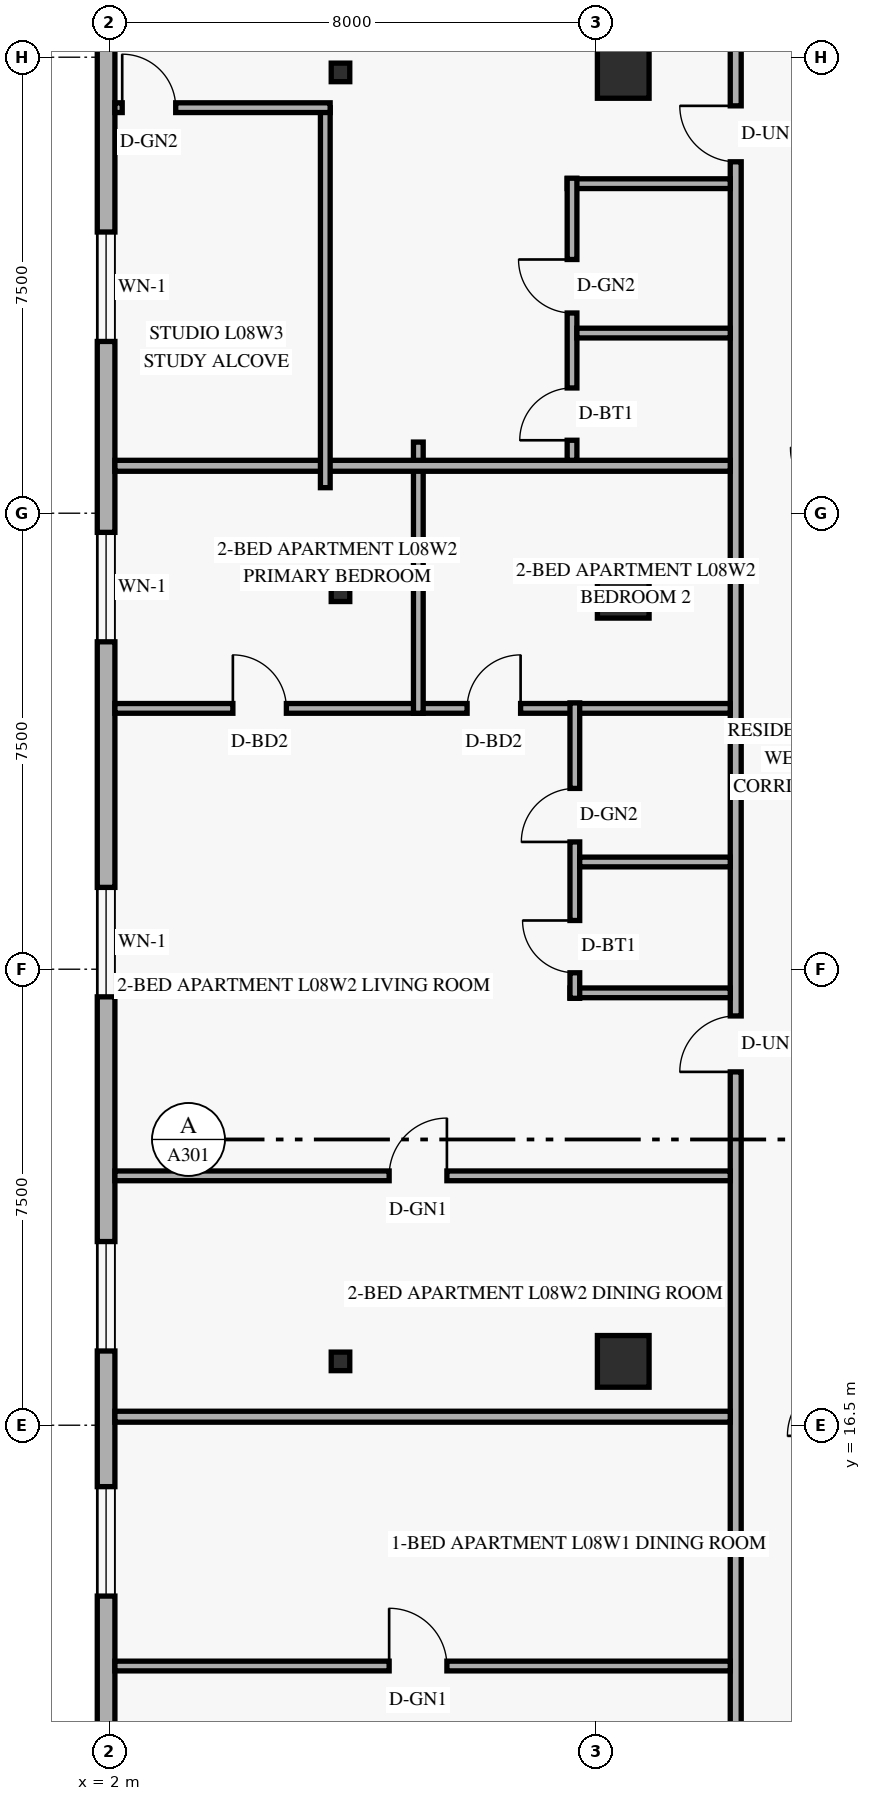
"""IFC4 building model, lengths in metres.
Left out: names, types, materials, properties, quantities, classifications, styles, units other than length and angle.
Written with IfcOpenShell. Run it as: python <this file> out.ifc"""

import sys

from ifc_helpers import new_model, si_unit, direction, frame, frame_2d, origin, origin_2d, place, context, subcontext, project, spatial, rectangle, hollow_rectangle, extrude, element, fill, save


model = new_model("IFC4")
c1 = context("Model", 3, precision=1e-05, world=origin(), true_north=direction((0.0, 1.0)))
c2 = subcontext(c1, "Body", "Model", "MODEL_VIEW")
j1 = project(units=[si_unit("LENGTHUNIT", "METRE"), si_unit("PLANEANGLEUNIT", "RADIAN")], contexts=[c1])
p1 = place(None, origin())
s1 = spatial("IfcSite", under=j1, at=p1, CompositionType="ELEMENT")
p2 = place(p1, origin())
s2 = spatial("IfcBuilding", under=s1, at=p2, CompositionType="ELEMENT")
p3 = place(p2, frame((0.0, 0.0, 34.8)))
s3 = spatial("IfcBuildingStorey", under=s2, at=p3, CompositionType="ELEMENT", Elevation=34.8)
for number, where, z_axis, x_axis in (
    (1, (5.8, 17.55, 0.0), (0.0, 0.0, 1.0), (1.0, 0.0, 0.0)),
    (2, (5.8, 30.2, 0.0), (0.0, 0.0, 1.0), (1.0, 0.0, 0.0)),
    (3, (5.8, 38.75, 0.0), (0.0, 0.0, 1.0), (1.0, 0.0, 0.0)),
):
    element("IfcColumn", number, at=place(p3, frame(where, z_axis=z_axis, x_axis=x_axis)), inside=s3, PredefinedType="COLUMN", context=c2, shape_type="SweptSolid", body=[
        extrude(hollow_rectangle(XDim=0.305, YDim=0.305, WallThickness=0.013, at=origin_2d()), origin(), (0.0, 0.0, 1.0), 3.6),
    ])
for number, where, z_axis, x_axis in (
    (4, (10.45, 17.55, 0.0), (0.0, 0.0, 1.0), (1.0, 0.0, 0.0)),
    (5, (10.45, 30.2, 0.0), (0.0, 0.0, 1.0), (1.0, 0.0, 0.0)),
    (6, (10.45, 38.75, 0.0), (0.0, 0.0, 1.0), (1.0, 0.0, 0.0)),
):
    element("IfcColumn", number, at=place(p3, frame(where, z_axis=z_axis, x_axis=x_axis)), inside=s3, PredefinedType="COLUMN", context=c2, shape_type="SweptSolid", body=[
        extrude(rectangle(XDim=0.85, YDim=0.85, at=origin_2d()), origin(), (0.0, 0.0, 1.0), 3.6),
    ])
p4 = place(p3, frame((1.945, 43.38, 0.0), z_axis=(0.0, 0.0, 1.0), x_axis=(0.0, -1.0, 0.0)))
e7 = element("IfcWall", 7, at=p4, inside=s3, PredefinedType="SOLIDWALL", context=c2, shape_type="SweptSolid", body=[
    extrude(rectangle(XDim=38.76, YDim=0.29, at=frame_2d((19.38, 0.0))), origin(), (0.0, 0.0, 1.0), 3.36),
])
p5 = place(p4, frame((33.9, 0.0, 0.85)))
e8 = element("IfcOpeningElement", 8, at=p5, cuts=e7, PredefinedType="OPENING", context=c2, shape_type="SweptSolid", body=[
    extrude(rectangle(XDim=1.8, YDim=1.6, at=frame_2d((0.9, 0.8))), frame((0.0, 0.155, 0.0), z_axis=(0.0, -1.0, 0.0), x_axis=(1.0, 0.0, 0.0)), (0.0, 0.0, 1.0), 0.31),
])
p6 = place(p4, frame((27.89, 0.0, 0.85)))
e9 = element("IfcOpeningElement", 9, at=p6, cuts=e7, PredefinedType="OPENING", context=c2, shape_type="SweptSolid", body=[
    extrude(rectangle(XDim=1.8, YDim=1.6, at=frame_2d((0.9, 0.8))), frame((0.0, 0.155, 0.0), z_axis=(0.0, -1.0, 0.0), x_axis=(1.0, 0.0, 0.0)), (0.0, 0.0, 1.0), 0.31),
])
p7 = place(p4, frame((23.859, 0.0, 0.85)))
e10 = element("IfcOpeningElement", 10, at=p7, cuts=e7, PredefinedType="OPENING", context=c2, shape_type="SweptSolid", body=[
    extrude(rectangle(XDim=1.8, YDim=1.6, at=frame_2d((0.9, 0.8))), frame((0.0, 0.155, 0.0), z_axis=(0.0, -1.0, 0.0), x_axis=(1.0, 0.0, 0.0)), (0.0, 0.0, 1.0), 0.31),
])
p8 = place(p4, frame((18.034, 0.0, 0.85)))
e11 = element("IfcOpeningElement", 11, at=p8, cuts=e7, PredefinedType="OPENING", context=c2, shape_type="SweptSolid", body=[
    extrude(rectangle(XDim=1.8, YDim=1.6, at=frame_2d((0.9, 0.8))), frame((0.0, 0.155, 0.0), z_axis=(0.0, -1.0, 0.0), x_axis=(1.0, 0.0, 0.0)), (0.0, 0.0, 1.0), 0.31),
])
p9 = place(p4, frame((12.195, 0.0, 0.85)))
e12 = element("IfcOpeningElement", 12, at=p9, cuts=e7, PredefinedType="OPENING", context=c2, shape_type="SweptSolid", body=[
    extrude(rectangle(XDim=1.8, YDim=1.6, at=frame_2d((0.9, 0.8))), frame((0.0, 0.155, 0.0), z_axis=(0.0, -1.0, 0.0), x_axis=(1.0, 0.0, 0.0)), (0.0, 0.0, 1.0), 0.31),
])
p10 = place(p4, frame((7.255, 0.0, 0.85)))
e13 = element("IfcOpeningElement", 13, at=p10, cuts=e7, PredefinedType="OPENING", context=c2, shape_type="SweptSolid", body=[
    extrude(rectangle(XDim=1.8, YDim=1.6, at=frame_2d((0.9, 0.8))), frame((0.0, 0.155, 0.0), z_axis=(0.0, -1.0, 0.0), x_axis=(1.0, 0.0, 0.0)), (0.0, 0.0, 1.0), 0.31),
])
p11 = place(p4, frame((1.705, 0.0, 0.85)))
e14 = element("IfcOpeningElement", 14, at=p11, cuts=e7, PredefinedType="OPENING", context=c2, shape_type="SweptSolid", body=[
    extrude(rectangle(XDim=1.8, YDim=1.6, at=frame_2d((0.9, 0.8))), frame((0.0, 0.155, 0.0), z_axis=(0.0, -1.0, 0.0), x_axis=(1.0, 0.0, 0.0)), (0.0, 0.0, 1.0), 0.31),
])
p12 = place(p3, frame((12.3, 1.29, 0.0), z_axis=(0.0, 0.0, 1.0), x_axis=(0.0, 1.0, 0.0)))
e15 = element("IfcWall", 15, at=p12, inside=s3, PredefinedType="STANDARD", context=c2, shape_type="SweptSolid", body=[
    extrude(rectangle(XDim=45.42, YDim=0.18, at=frame_2d((22.71, 0.0))), origin(), (0.0, 0.0, 1.0), 2.649),
])
p13 = place(p12, frame((8.06, 0.0, 0.0)))
e16 = element("IfcOpeningElement", 16, at=p13, cuts=e15, PredefinedType="OPENING", context=c2, shape_type="SweptSolid", body=[
    extrude(rectangle(XDim=0.92, YDim=2.15, at=frame_2d((0.46, 1.075))), frame((0.0, 0.1, 0.0), z_axis=(0.0, -1.0, 0.0), x_axis=(1.0, 0.0, 0.0)), (0.0, 0.0, 1.0), 0.2),
])
p14 = place(p12, frame((21.021, 0.0, 0.0)))
e17 = element("IfcOpeningElement", 17, at=p14, cuts=e15, PredefinedType="OPENING", context=c2, shape_type="SweptSolid", body=[
    extrude(rectangle(XDim=0.92, YDim=2.15, at=frame_2d((0.46, 1.075))), frame((0.0, 0.1, 0.0), z_axis=(0.0, -1.0, 0.0), x_axis=(1.0, 0.0, 0.0)), (0.0, 0.0, 1.0), 0.2),
])
p15 = place(p12, frame((35.99, 0.0, 0.0)))
e18 = element("IfcOpeningElement", 18, at=p15, cuts=e15, PredefinedType="OPENING", context=c2, shape_type="SweptSolid", body=[
    extrude(rectangle(XDim=0.92, YDim=2.15, at=frame_2d((0.46, 1.075))), frame((0.0, 0.1, 0.0), z_axis=(0.0, -1.0, 0.0), x_axis=(1.0, 0.0, 0.0)), (0.0, 0.0, 1.0), 0.2),
])
p16 = place(p3, frame((2.09, 12.54, 0.0), z_axis=(0.0, 0.0, 1.0), x_axis=(1.0, 0.0, 0.0)))
e19 = element("IfcWall", 19, at=p16, inside=s3, PredefinedType="PARTITIONING", context=c2, shape_type="SweptSolid", body=[
    extrude(rectangle(XDim=10.12, YDim=0.16, at=frame_2d((5.06, 0.0))), origin(), (0.0, 0.0, 1.0), 2.649),
])
p17 = place(p16, frame((4.51, 0.0, 0.0)))
e20 = element("IfcOpeningElement", 20, at=p17, cuts=e19, PredefinedType="OPENING", context=c2, shape_type="SweptSolid", body=[
    extrude(rectangle(XDim=0.95, YDim=2.15, at=frame_2d((0.475, 1.075))), frame((0.0, 0.09, 0.0), z_axis=(0.0, -1.0, 0.0), x_axis=(1.0, 0.0, 0.0)), (0.0, 0.0, 1.0), 0.18),
])
p18 = place(p3, frame((2.09, 16.64, 0.0), z_axis=(0.0, 0.0, 1.0), x_axis=(1.0, 0.0, 0.0)))
e21 = element("IfcWall", 21, at=p18, inside=s3, PredefinedType="PARTITIONING", context=c2, shape_type="SweptSolid", body=[
    extrude(rectangle(XDim=10.12, YDim=0.18, at=frame_2d((5.06, 0.0))), origin(), (0.0, 0.0, 1.0), 2.649),
])
p19 = place(p3, frame((2.09, 28.29, 0.0), z_axis=(0.0, 0.0, 1.0), x_axis=(1.0, 0.0, 0.0)))
e22 = element("IfcWall", 22, at=p19, inside=s3, PredefinedType="PARTITIONING", context=c2, shape_type="SweptSolid", body=[
    extrude(rectangle(XDim=10.12, YDim=0.16, at=frame_2d((5.06, 0.0))), origin(), (0.0, 0.0, 1.0), 2.649),
])
p20 = place(p19, frame((1.94, 0.0, 0.0)))
e23 = element("IfcOpeningElement", 23, at=p20, cuts=e22, PredefinedType="OPENING", context=c2, shape_type="SweptSolid", body=[
    extrude(rectangle(XDim=0.88, YDim=2.14, at=frame_2d((0.44, 1.07))), frame((0.0, 0.09, 0.0), z_axis=(0.0, -1.0, 0.0), x_axis=(1.0, 0.0, 0.0)), (0.0, 0.0, 1.0), 0.18),
])
p21 = place(p19, frame((5.792, 0.0, 0.0)))
e24 = element("IfcOpeningElement", 24, at=p21, cuts=e22, PredefinedType="OPENING", context=c2, shape_type="SweptSolid", body=[
    extrude(rectangle(XDim=0.88, YDim=2.14, at=frame_2d((0.44, 1.07))), frame((0.0, 0.09, 0.0), z_axis=(0.0, -1.0, 0.0), x_axis=(1.0, 0.0, 0.0)), (0.0, 0.0, 1.0), 0.18),
])
p22 = place(p3, frame((9.574, 23.612, 0.0), z_axis=(0.0, 0.0, 1.0), x_axis=(1.0, 0.0, 0.0)))
e25 = element("IfcWall", 25, at=p22, inside=s3, PredefinedType="PLUMBINGWALL", context=c2, shape_type="SweptSolid", body=[
    extrude(rectangle(XDim=2.636, YDim=0.16, at=frame_2d((1.318, 0.0))), origin(), (0.0, 0.0, 1.0), 2.649),
])
p23 = place(p3, frame((9.654, 23.521, 0.0), z_axis=(0.0, 0.0, 1.0), x_axis=(0.0, 1.0, 0.0)))
e26 = element("IfcWall", 26, at=p23, inside=s3, PredefinedType="PLUMBINGWALL", context=c2, shape_type="SweptSolid", body=[
    extrude(rectangle(XDim=4.858, YDim=0.16, at=frame_2d((2.429, 0.0))), origin(), (0.0, 0.0, 1.0), 2.932),
])
p24 = place(p23, frame((0.42, 0.0, 0.0)))
e27 = element("IfcOpeningElement", 27, at=p24, cuts=e26, PredefinedType="OPENING", context=c2, shape_type="SweptSolid", body=[
    extrude(rectangle(XDim=0.86, YDim=2.12, at=frame_2d((0.43, 1.06))), frame((0.0, 0.09, 0.0), z_axis=(0.0, -1.0, 0.0), x_axis=(1.0, 0.0, 0.0)), (0.0, 0.0, 1.0), 0.18),
])
p25 = place(p23, frame((2.572, 0.0, 0.0)))
e28 = element("IfcOpeningElement", 28, at=p25, cuts=e26, PredefinedType="OPENING", context=c2, shape_type="SweptSolid", body=[
    extrude(rectangle(XDim=0.88, YDim=2.12, at=frame_2d((0.44, 1.06))), frame((0.0, 0.09, 0.0), z_axis=(0.0, -1.0, 0.0), x_axis=(1.0, 0.0, 0.0)), (0.0, 0.0, 1.0), 0.18),
])
p26 = place(p3, frame((9.734, 25.764, 0.0), z_axis=(0.0, 0.0, 1.0), x_axis=(1.0, 0.0, 0.0)))
e29 = element("IfcWall", 29, at=p26, inside=s3, PredefinedType="PLUMBINGWALL", context=c2, shape_type="SweptSolid", body=[
    extrude(rectangle(XDim=2.476, YDim=0.16, at=frame_2d((1.238, 0.0))), origin(), (0.0, 0.0, 1.0), 2.649),
])
p27 = place(p3, frame((2.09, 20.602, 0.0), z_axis=(0.0, 0.0, 1.0), x_axis=(1.0, 0.0, 0.0)))
e30 = element("IfcWall", 30, at=p27, inside=s3, PredefinedType="PARTITIONING", context=c2, shape_type="SweptSolid", body=[
    extrude(rectangle(XDim=10.12, YDim=0.16, at=frame_2d((5.06, 0.0))), origin(), (0.0, 0.0, 1.0), 2.649),
])
p28 = place(p27, frame((4.51, 0.0, 0.0)))
e31 = element("IfcOpeningElement", 31, at=p28, cuts=e30, PredefinedType="OPENING", context=c2, shape_type="SweptSolid", body=[
    extrude(rectangle(XDim=0.95, YDim=2.15, at=frame_2d((0.475, 1.075))), frame((0.0, 0.09, 0.0), z_axis=(0.0, -1.0, 0.0), x_axis=(1.0, 0.0, 0.0)), (0.0, 0.0, 1.0), 0.18),
])
p29 = place(p3, frame((7.08, 28.21, 0.0), z_axis=(0.0, 0.0, 1.0), x_axis=(0.0, 1.0, 0.0)))
e32 = element("IfcWall", 32, at=p29, inside=s3, PredefinedType="PARTITIONING", context=c2, shape_type="SweptSolid", body=[
    extrude(rectangle(XDim=4.46, YDim=0.16, at=frame_2d((2.23, 0.0))), origin(), (0.0, 0.0, 1.0), 2.649),
])
p30 = place(p3, frame((2.09, 32.28, 0.0), z_axis=(0.0, 0.0, 1.0), x_axis=(1.0, 0.0, 0.0)))
e33 = element("IfcWall", 33, at=p30, inside=s3, PredefinedType="PARTITIONING", context=c2, shape_type="SweptSolid", body=[
    extrude(rectangle(XDim=10.12, YDim=0.18, at=frame_2d((5.06, 0.0))), origin(), (0.0, 0.0, 1.0), 2.649),
])
p31 = place(p3, frame((9.528, 36.92, 0.0), z_axis=(0.0, 0.0, 1.0), x_axis=(1.0, 0.0, 0.0)))
e34 = element("IfcWall", 34, at=p31, inside=s3, PredefinedType="PLUMBINGWALL", context=c2, shape_type="SweptSolid", body=[
    extrude(rectangle(XDim=2.682, YDim=0.16, at=frame_2d((1.341, 0.0))), origin(), (0.0, 0.0, 1.0), 2.649),
])
p32 = place(p3, frame((9.608, 32.37, 0.0), z_axis=(0.0, 0.0, 1.0), x_axis=(0.0, 1.0, 0.0)))
e35 = element("IfcWall", 35, at=p32, inside=s3, PredefinedType="PLUMBINGWALL", context=c2, shape_type="SweptSolid", body=[
    extrude(rectangle(XDim=4.64, YDim=0.16, at=frame_2d((2.32, 0.0))), origin(), (0.0, 0.0, 1.0), 2.932),
])
p33 = place(p32, frame((0.33, 0.0, 0.0)))
e36 = element("IfcOpeningElement", 36, at=p33, cuts=e35, PredefinedType="OPENING", context=c2, shape_type="SweptSolid", body=[
    extrude(rectangle(XDim=0.86, YDim=2.12, at=frame_2d((0.43, 1.06))), frame((0.0, 0.09, 0.0), z_axis=(0.0, -1.0, 0.0), x_axis=(1.0, 0.0, 0.0)), (0.0, 0.0, 1.0), 0.18),
])
p34 = place(p32, frame((2.423, 0.0, 0.0)))
e37 = element("IfcOpeningElement", 37, at=p34, cuts=e35, PredefinedType="OPENING", context=c2, shape_type="SweptSolid", body=[
    extrude(rectangle(XDim=0.88, YDim=2.12, at=frame_2d((0.44, 1.06))), frame((0.0, 0.09, 0.0), z_axis=(0.0, -1.0, 0.0), x_axis=(1.0, 0.0, 0.0)), (0.0, 0.0, 1.0), 0.18),
])
p35 = place(p3, frame((9.688, 34.463, 0.0), z_axis=(0.0, 0.0, 1.0), x_axis=(1.0, 0.0, 0.0)))
e38 = element("IfcWall", 38, at=p35, inside=s3, PredefinedType="PLUMBINGWALL", context=c2, shape_type="SweptSolid", body=[
    extrude(rectangle(XDim=2.522, YDim=0.16, at=frame_2d((1.261, 0.0))), origin(), (0.0, 0.0, 1.0), 2.649),
])
p36 = place(p3, frame((5.55, 31.92, 0.0), z_axis=(0.0, 0.0, 1.0), x_axis=(0.0, 1.0, 0.0)))
e39 = element("IfcWall", 39, at=p36, inside=s3, PredefinedType="PARTITIONING", context=c2, shape_type="SweptSolid", body=[
    extrude(rectangle(XDim=6.25, YDim=0.16, at=frame_2d((3.125, 0.0))), origin(), (0.0, 0.0, 1.0), 3.36),
])
p37 = place(p3, frame((2.09, 38.17, 0.0), z_axis=(0.0, 0.0, 1.0), x_axis=(1.0, 0.0, 0.0)))
e40 = element("IfcWall", 40, at=p37, inside=s3, PredefinedType="PARTITIONING", context=c2, shape_type="SweptSolid", body=[
    extrude(rectangle(XDim=3.54, YDim=0.16, at=frame_2d((1.77, 0.0))), origin(), (0.0, 0.0, 1.0), 3.36),
])
p38 = place(p37, frame((0.12, 0.0, 0.0)))
e41 = element("IfcOpeningElement", 41, at=p38, cuts=e40, PredefinedType="OPENING", context=c2, shape_type="SweptSolid", body=[
    extrude(rectangle(XDim=0.88, YDim=2.12, at=frame_2d((0.44, 1.06))), frame((0.0, 0.09, 0.0), z_axis=(0.0, -1.0, 0.0), x_axis=(1.0, 0.0, 0.0)), (0.0, 0.0, 1.0), 0.18),
])
p39 = place(p6, origin())
e42 = element("IfcWindow", 42, at=p39, inside=s3, PartitioningType="SINGLE_PANEL", PredefinedType="WINDOW", context=c2, shape_type="SweptSolid", body=[
    extrude(rectangle(XDim=1.8, YDim=1.6, at=frame_2d((0.9, 0.8))), frame((0.0, 0.03, 0.0), z_axis=(0.0, -1.0, 0.0), x_axis=(1.0, 0.0, 0.0)), (0.0, 0.0, 1.0), 0.06),
])
fill(e9, e42)
p40 = place(p7, origin())
e43 = element("IfcWindow", 43, at=p40, inside=s3, PartitioningType="SINGLE_PANEL", PredefinedType="WINDOW", context=c2, shape_type="SweptSolid", body=[
    extrude(rectangle(XDim=1.8, YDim=1.6, at=frame_2d((0.9, 0.8))), frame((0.0, 0.03, 0.0), z_axis=(0.0, -1.0, 0.0), x_axis=(1.0, 0.0, 0.0)), (0.0, 0.0, 1.0), 0.06),
])
fill(e10, e43)
p41 = place(p8, origin())
e44 = element("IfcWindow", 44, at=p41, inside=s3, PartitioningType="SINGLE_PANEL", PredefinedType="WINDOW", context=c2, shape_type="SweptSolid", body=[
    extrude(rectangle(XDim=1.8, YDim=1.6, at=frame_2d((0.9, 0.8))), frame((0.0, 0.03, 0.0), z_axis=(0.0, -1.0, 0.0), x_axis=(1.0, 0.0, 0.0)), (0.0, 0.0, 1.0), 0.06),
])
fill(e11, e44)
p42 = place(p9, origin())
e45 = element("IfcWindow", 45, at=p42, inside=s3, PartitioningType="SINGLE_PANEL", PredefinedType="WINDOW", context=c2, shape_type="SweptSolid", body=[
    extrude(rectangle(XDim=1.8, YDim=1.6, at=frame_2d((0.9, 0.8))), frame((0.0, 0.03, 0.0), z_axis=(0.0, -1.0, 0.0), x_axis=(1.0, 0.0, 0.0)), (0.0, 0.0, 1.0), 0.06),
])
fill(e12, e45)
p43 = place(p10, origin())
e46 = element("IfcWindow", 46, at=p43, inside=s3, PartitioningType="SINGLE_PANEL", PredefinedType="WINDOW", context=c2, shape_type="SweptSolid", body=[
    extrude(rectangle(XDim=1.8, YDim=1.6, at=frame_2d((0.9, 0.8))), frame((0.0, 0.03, 0.0), z_axis=(0.0, -1.0, 0.0), x_axis=(1.0, 0.0, 0.0)), (0.0, 0.0, 1.0), 0.06),
])
fill(e13, e46)
p44 = place(p17, origin())
e47 = element("IfcDoor", 47, at=p44, inside=s3, OperationType="SINGLE_SWING_LEFT", PredefinedType="DOOR", context=c2, shape_type="SweptSolid", body=[
    extrude(rectangle(XDim=0.95, YDim=2.15, at=frame_2d((0.475, 1.075))), frame((0.0, 0.025, 0.0), z_axis=(0.0, -1.0, 0.0), x_axis=(1.0, 0.0, 0.0)), (0.0, 0.0, 1.0), 0.05),
])
fill(e20, e47)
p45 = place(p28, origin())
e48 = element("IfcDoor", 48, at=p45, inside=s3, OperationType="SINGLE_SWING_RIGHT", PredefinedType="DOOR", context=c2, shape_type="SweptSolid", body=[
    extrude(rectangle(XDim=0.95, YDim=2.15, at=frame_2d((0.475, 1.075))), frame((0.0, 0.025, 0.0), z_axis=(0.0, -1.0, 0.0), x_axis=(1.0, 0.0, 0.0)), (0.0, 0.0, 1.0), 0.05),
])
fill(e31, e48)
p46 = place(p14, origin())
e49 = element("IfcDoor", 49, at=p46, inside=s3, OperationType="SINGLE_SWING_LEFT", PredefinedType="DOOR", context=c2, shape_type="SweptSolid", body=[
    extrude(rectangle(XDim=0.92, YDim=2.15, at=frame_2d((0.46, 1.075))), frame((0.0, 0.025, 0.0), z_axis=(0.0, -1.0, 0.0), x_axis=(1.0, 0.0, 0.0)), (0.0, 0.0, 1.0), 0.05),
])
fill(e17, e49)
p47 = place(p24, origin())
e50 = element("IfcDoor", 50, at=p47, inside=s3, OperationType="SINGLE_SWING_RIGHT", PredefinedType="DOOR", context=c2, shape_type="SweptSolid", body=[
    extrude(rectangle(XDim=0.86, YDim=2.12, at=frame_2d((0.43, 1.06))), frame((0.0, 0.025, 0.0), z_axis=(0.0, -1.0, 0.0), x_axis=(1.0, 0.0, 0.0)), (0.0, 0.0, 1.0), 0.05),
])
fill(e27, e50)
p48 = place(p25, origin())
e51 = element("IfcDoor", 51, at=p48, inside=s3, OperationType="SINGLE_SWING_LEFT", PredefinedType="DOOR", context=c2, shape_type="SweptSolid", body=[
    extrude(rectangle(XDim=0.88, YDim=2.12, at=frame_2d((0.44, 1.06))), frame((0.0, 0.025, 0.0), z_axis=(0.0, -1.0, 0.0), x_axis=(1.0, 0.0, 0.0)), (0.0, 0.0, 1.0), 0.05),
])
fill(e28, e51)
p49 = place(p20, origin())
e52 = element("IfcDoor", 52, at=p49, inside=s3, OperationType="SINGLE_SWING_LEFT", PredefinedType="DOOR", context=c2, shape_type="SweptSolid", body=[
    extrude(rectangle(XDim=0.88, YDim=2.14, at=frame_2d((0.44, 1.07))), frame((0.0, 0.025, 0.0), z_axis=(0.0, -1.0, 0.0), x_axis=(1.0, 0.0, 0.0)), (0.0, 0.0, 1.0), 0.05),
])
fill(e23, e52)
p50 = place(p21, origin())
e53 = element("IfcDoor", 53, at=p50, inside=s3, OperationType="SINGLE_SWING_RIGHT", PredefinedType="DOOR", context=c2, shape_type="SweptSolid", body=[
    extrude(rectangle(XDim=0.88, YDim=2.14, at=frame_2d((0.44, 1.07))), frame((0.0, 0.025, 0.0), z_axis=(0.0, -1.0, 0.0), x_axis=(1.0, 0.0, 0.0)), (0.0, 0.0, 1.0), 0.05),
])
fill(e24, e53)
p51 = place(p38, origin())
e54 = element("IfcDoor", 54, at=p51, inside=s3, OperationType="SINGLE_SWING_LEFT", PredefinedType="DOOR", context=c2, shape_type="SweptSolid", body=[
    extrude(rectangle(XDim=0.88, YDim=2.12, at=frame_2d((0.44, 1.06))), frame((0.0, 0.025, 0.0), z_axis=(0.0, -1.0, 0.0), x_axis=(1.0, 0.0, 0.0)), (0.0, 0.0, 1.0), 0.05),
])
fill(e41, e54)
p52 = place(p15, origin())
e55 = element("IfcDoor", 55, at=p52, inside=s3, OperationType="SINGLE_SWING_RIGHT", PredefinedType="DOOR", context=c2, shape_type="SweptSolid", body=[
    extrude(rectangle(XDim=0.92, YDim=2.15, at=frame_2d((0.46, 1.075))), frame((0.0, 0.025, 0.0), z_axis=(0.0, -1.0, 0.0), x_axis=(1.0, 0.0, 0.0)), (0.0, 0.0, 1.0), 0.05),
])
fill(e18, e55)
p53 = place(p33, origin())
e56 = element("IfcDoor", 56, at=p53, inside=s3, OperationType="SINGLE_SWING_LEFT", PredefinedType="DOOR", context=c2, shape_type="SweptSolid", body=[
    extrude(rectangle(XDim=0.86, YDim=2.12, at=frame_2d((0.43, 1.06))), frame((0.0, 0.025, 0.0), z_axis=(0.0, -1.0, 0.0), x_axis=(1.0, 0.0, 0.0)), (0.0, 0.0, 1.0), 0.05),
])
fill(e36, e56)
p54 = place(p34, origin())
e57 = element("IfcDoor", 57, at=p54, inside=s3, OperationType="SINGLE_SWING_RIGHT", PredefinedType="DOOR", context=c2, shape_type="SweptSolid", body=[
    extrude(rectangle(XDim=0.88, YDim=2.12, at=frame_2d((0.44, 1.06))), frame((0.0, 0.025, 0.0), z_axis=(0.0, -1.0, 0.0), x_axis=(1.0, 0.0, 0.0)), (0.0, 0.0, 1.0), 0.05),
])
fill(e37, e57)
save(model, sys.argv[1])
